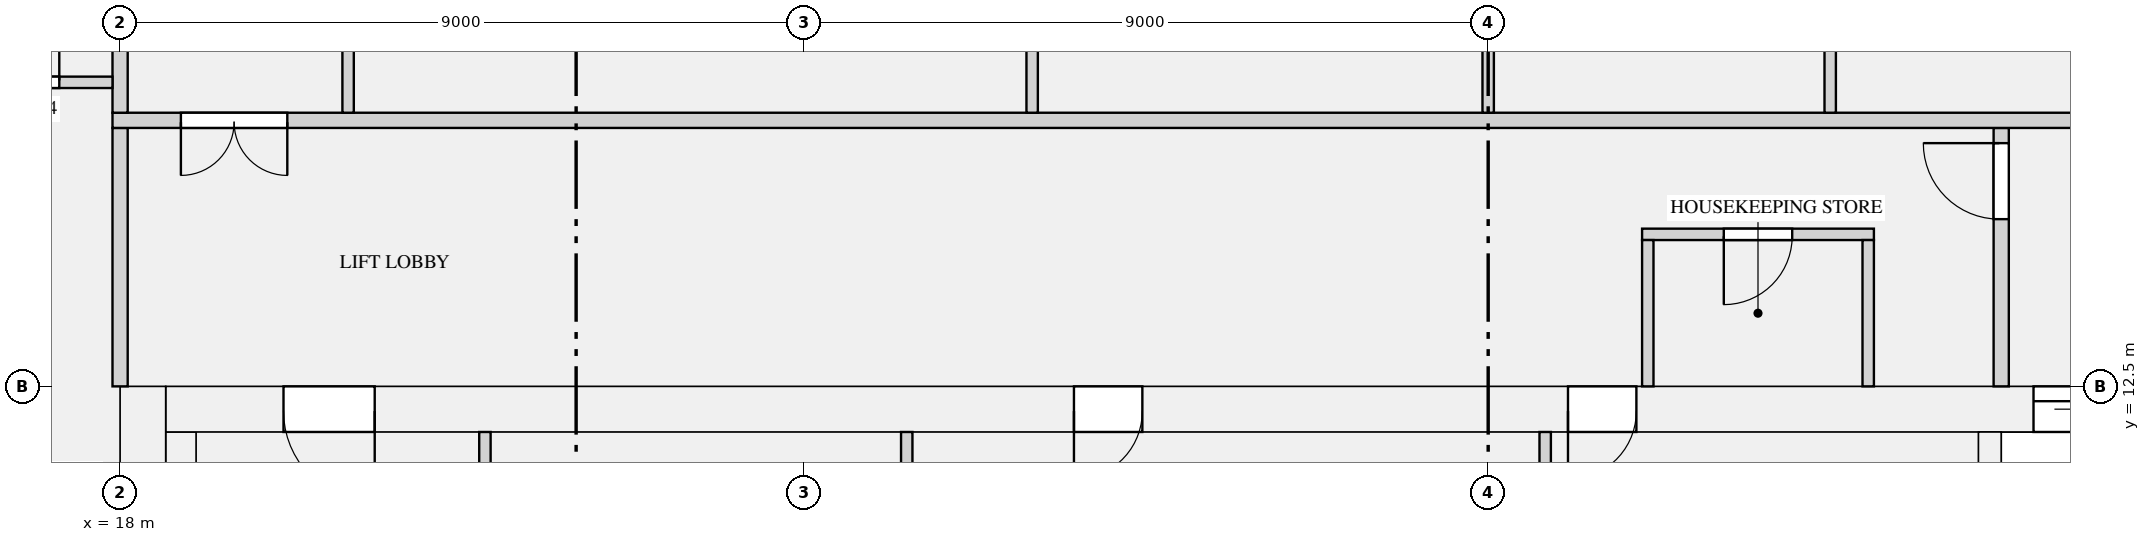
"""IFC4 building model, lengths in metres.
Left out: names, types, materials, properties, quantities, classifications, styles, units other than length and angle.
Written with IfcOpenShell. Run it as: python <this file> out.ifc"""

import sys

from ifc_helpers import new_model, si_unit, direction, frame, frame_2d, origin, place, context, subcontext, project, spatial, rectangle, extrude, element, fill, save


model = new_model("IFC4")
c1 = context("Model", 3, precision=1e-05, world=origin(), true_north=direction((0.0, 1.0)))
c2 = subcontext(c1, "Body", "Model", "MODEL_VIEW")
j1 = project(units=[si_unit("LENGTHUNIT", "METRE"), si_unit("PLANEANGLEUNIT", "RADIAN")], contexts=[c1])
p1 = place(None, origin())
s1 = spatial("IfcSite", under=j1, at=p1, CompositionType="ELEMENT")
p2 = place(p1, origin())
s2 = spatial("IfcBuilding", under=s1, at=p2, CompositionType="ELEMENT")
p3 = place(p2, frame((0.0, 0.0, 223.2)))
s3 = spatial("IfcBuildingStorey", under=s2, at=p3, CompositionType="ELEMENT", Elevation=223.2)
p4 = place(p3, frame((18.3, 0.0, 0.0), z_axis=(0.0, 0.0, 1.0), x_axis=(0.0, 1.0, 0.0)))
e1 = element("IfcWall", 1, at=p4, inside=s3, PredefinedType="SHEAR", context=c2, shape_type="SweptSolid", body=[
    extrude(rectangle(XDim=12.5, YDim=0.6, at=frame_2d((6.25, 0.0))), origin(), (0.0, 0.0, 1.0), 3.15),
])
p5 = place(p3, frame((18.6, 12.2, 0.0), z_axis=(0.0, 0.0, 1.0), x_axis=(1.0, 0.0, 0.0)))
e2 = element("IfcWall", 2, at=p5, inside=s3, PredefinedType="SHEAR", context=c2, shape_type="SweptSolid", body=[
    extrude(rectangle(XDim=34.8, YDim=0.6, at=frame_2d((17.4, 0.0))), origin(), (0.0, 0.0, 1.0), 3.15),
])
p6 = place(p5, frame((24.575, 0.0, 0.0)))
e3 = element("IfcOpeningElement", 3, at=p6, cuts=e2, PredefinedType="OPENING", context=c2, shape_type="SweptSolid", body=[
    extrude(rectangle(XDim=1.1, YDim=2.1, at=frame_2d((0.55, 1.05))), frame((0.0, 0.31, 0.0), z_axis=(0.0, -1.0, 0.0), x_axis=(1.0, 0.0, 0.0)), (0.0, 0.0, 1.0), 0.62),
])
p7 = place(p5, frame((26.825, 0.0, 0.0)))
e4 = element("IfcOpeningElement", 4, at=p7, cuts=e2, PredefinedType="OPENING", context=c2, shape_type="SweptSolid", body=[
    extrude(rectangle(XDim=1.1, YDim=2.1, at=frame_2d((0.55, 1.05))), frame((0.0, 0.31, 0.0), z_axis=(0.0, -1.0, 0.0), x_axis=(1.0, 0.0, 0.0)), (0.0, 0.0, 1.0), 0.62),
])
p8 = place(p5, frame((29.075, 0.0, 0.0)))
e5 = element("IfcOpeningElement", 5, at=p8, cuts=e2, PredefinedType="OPENING", context=c2, shape_type="SweptSolid", body=[
    extrude(rectangle(XDim=1.1, YDim=2.1, at=frame_2d((0.55, 1.05))), frame((0.0, 0.31, 0.0), z_axis=(0.0, -1.0, 0.0), x_axis=(1.0, 0.0, 0.0)), (0.0, 0.0, 1.0), 0.62),
])
p9 = place(p5, frame((11.95, 0.0, 0.0)))
e6 = element("IfcOpeningElement", 6, at=p9, cuts=e2, PredefinedType="OPENING", context=c2, shape_type="SweptSolid", body=[
    extrude(rectangle(XDim=0.9, YDim=2.1, at=frame_2d((0.45, 1.05))), frame((0.0, 0.31, 0.0), z_axis=(0.0, -1.0, 0.0), x_axis=(1.0, 0.0, 0.0)), (0.0, 0.0, 1.0), 0.62),
])
p10 = place(p5, frame((18.45, 0.0, 0.0)))
e7 = element("IfcOpeningElement", 7, at=p10, cuts=e2, PredefinedType="OPENING", context=c2, shape_type="SweptSolid", body=[
    extrude(rectangle(XDim=0.9, YDim=2.1, at=frame_2d((0.45, 1.05))), frame((0.0, 0.31, 0.0), z_axis=(0.0, -1.0, 0.0), x_axis=(1.0, 0.0, 0.0)), (0.0, 0.0, 1.0), 0.62),
])
p11 = place(p5, frame((1.55, 0.0, 0.0)))
e8 = element("IfcOpeningElement", 8, at=p11, cuts=e2, PredefinedType="OPENING", context=c2, shape_type="SweptSolid", body=[
    extrude(rectangle(XDim=1.2, YDim=2.1, at=frame_2d((0.6, 1.05))), frame((0.0, 0.31, 0.0), z_axis=(0.0, -1.0, 0.0), x_axis=(1.0, 0.0, 0.0)), (0.0, 0.0, 1.0), 0.62),
])
p12 = place(p5, frame((32.05, 0.0, 0.0)))
e9 = element("IfcOpeningElement", 9, at=p12, cuts=e2, PredefinedType="OPENING", context=c2, shape_type="SweptSolid", body=[
    extrude(rectangle(XDim=1.2, YDim=2.1, at=frame_2d((0.6, 1.05))), frame((0.0, 0.31, 0.0), z_axis=(0.0, -1.0, 0.0), x_axis=(1.0, 0.0, 0.0)), (0.0, 0.0, 1.0), 0.62),
])
p13 = place(p3, frame((18.8, 1.0, 0.0), z_axis=(0.0, 0.0, 1.0), x_axis=(0.0, 1.0, 0.0)))
e10 = element("IfcWall", 10, at=p13, inside=s3, PredefinedType="SHEAR", context=c2, shape_type="SweptSolid", body=[
    extrude(rectangle(XDim=10.9, YDim=0.4, at=frame_2d((5.45, 0.0))), origin(), (0.0, 0.0, 1.0), 3.15),
])
p14 = place(p3, frame((42.6, 8.25, 0.0), z_axis=(0.0, 0.0, 1.0), x_axis=(0.0, 1.0, 0.0)))
e11 = element("IfcWall", 11, at=p14, inside=s3, PredefinedType="SHEAR", context=c2, shape_type="SweptSolid", body=[
    extrude(rectangle(XDim=3.65, YDim=0.3, at=frame_2d((1.825, 0.0))), origin(), (0.0, 0.0, 1.0), 3.15),
])
p15 = place(p3, frame((38.025, 14.5, 0.0), z_axis=(0.0, 0.0, 1.0), x_axis=(1.0, 0.0, 0.0)))
e12 = element("IfcWall", 12, at=p15, inside=s3, PredefinedType="PARTITIONING", context=c2, shape_type="SweptSolid", body=[
    extrude(rectangle(XDim=3.05, YDim=0.15, at=frame_2d((1.525, 0.0))), origin(), (0.0, 0.0, 1.0), 2.83),
])
p16 = place(p15, frame((1.075, 0.0, 0.0)))
e13 = element("IfcOpeningElement", 13, at=p16, cuts=e12, PredefinedType="OPENING", context=c2, shape_type="SweptSolid", body=[
    extrude(rectangle(XDim=0.9, YDim=2.1, at=frame_2d((0.45, 1.05))), frame((0.0, 0.085, 0.0), z_axis=(0.0, -1.0, 0.0), x_axis=(1.0, 0.0, 0.0)), (0.0, 0.0, 1.0), 0.17),
])
p17 = place(p3, frame((22.8, 6.725, 0.0), z_axis=(0.0, 0.0, 1.0), x_axis=(0.0, 1.0, 0.0)))
e14 = element("IfcWall", 14, at=p17, inside=s3, PredefinedType="PARTITIONING", context=c2, shape_type="SweptSolid", body=[
    extrude(rectangle(XDim=5.175, YDim=0.15, at=frame_2d((2.587, 0.0))), origin(), (0.0, 0.0, 1.0), 2.83),
])
for number, where, z_axis, x_axis in (
    (15, (28.35, 9.265, 0.0), (0.0, 0.0, 1.0), (0.0, 1.0, 0.0)),
    (16, (36.75, 9.265, 0.0), (0.0, 0.0, 1.0), (0.0, 1.0, 0.0)),
):
    element("IfcWall", number, at=place(p3, frame(where, z_axis=z_axis, x_axis=x_axis)), inside=s3, PredefinedType="PARTITIONING", context=c2, shape_type="SweptSolid", body=[
        extrude(rectangle(XDim=2.635, YDim=0.15, at=frame_2d((1.317, 0.0))), origin(), (0.0, 0.0, 1.0), 2.83),
    ])
p18 = place(p3, frame((18.0, 12.5, 0.0), z_axis=(0.0, 0.0, 1.0), x_axis=(0.0, 1.0, 0.0)))
e17 = element("IfcWall", 17, at=p18, inside=s3, PredefinedType="PARTITIONING", context=c2, shape_type="SweptSolid", body=[
    extrude(rectangle(XDim=3.4, YDim=0.2, at=frame_2d((1.7, 0.0))), origin(), (0.0, 0.0, 1.0), 2.83),
])
for number, where, z_axis, x_axis in (
    (18, (38.1, 12.5, 0.0), (0.0, 0.0, 1.0), (0.0, 1.0, 0.0)),
    (19, (41.0, 12.5, 0.0), (0.0, 0.0, 1.0), (0.0, 1.0, 0.0)),
):
    element("IfcWall", number, at=place(p3, frame(where, z_axis=z_axis, x_axis=x_axis)), inside=s3, PredefinedType="PARTITIONING", context=c2, shape_type="SweptSolid", body=[
        extrude(rectangle(XDim=1.925, YDim=0.15, at=frame_2d((0.962, 0.0))), origin(), (0.0, 0.0, 1.0), 2.83),
    ])
p19 = place(p3, frame((42.75, 12.5, 0.0), z_axis=(0.0, 0.0, 1.0), x_axis=(0.0, 1.0, 0.0)))
e20 = element("IfcWall", 20, at=p19, inside=s3, PredefinedType="PARTITIONING", context=c2, shape_type="SweptSolid", body=[
    extrude(rectangle(XDim=3.4, YDim=0.2, at=frame_2d((1.7, 0.0))), origin(), (0.0, 0.0, 1.0), 2.83),
])
p20 = place(p19, frame((2.2, 0.0, 0.0)))
e21 = element("IfcOpeningElement", 21, at=p20, cuts=e20, PredefinedType="OPENING", context=c2, shape_type="SweptSolid", body=[
    extrude(rectangle(XDim=1.0, YDim=2.1, at=frame_2d((0.5, 1.05))), frame((0.0, 0.11, 0.0), z_axis=(0.0, -1.0, 0.0), x_axis=(1.0, 0.0, 0.0)), (0.0, 0.0, 1.0), 0.22),
])
p21 = place(p3, frame((12.15, 16.5, 0.0), z_axis=(0.0, 0.0, 1.0), x_axis=(1.0, 0.0, 0.0)))
e22 = element("IfcWall", 22, at=p21, inside=s3, PredefinedType="PARTITIONING", context=c2, shape_type="SweptSolid", body=[
    extrude(rectangle(XDim=5.75, YDim=0.15, at=frame_2d((2.875, 0.0))), origin(), (0.0, 0.0, 1.0), 2.83),
])
p22 = place(p21, frame((4.15, 0.0, 0.0)))
e23 = element("IfcOpeningElement", 23, at=p22, cuts=e22, PredefinedType="OPENING", context=c2, shape_type="SweptSolid", body=[
    extrude(rectangle(XDim=0.9, YDim=2.1, at=frame_2d((0.45, 1.05))), frame((0.0, 0.085, 0.0), z_axis=(0.0, -1.0, 0.0), x_axis=(1.0, 0.0, 0.0)), (0.0, 0.0, 1.0), 0.17),
])
p23 = place(p3, frame((17.9, 16.0, 0.0), z_axis=(0.0, 0.0, 1.0), x_axis=(1.0, 0.0, 0.0)))
e24 = element("IfcWall", 24, at=p23, inside=s3, PredefinedType="PARTITIONING", context=c2, shape_type="SweptSolid", body=[
    extrude(rectangle(XDim=36.2, YDim=0.2, at=frame_2d((18.1, 0.0))), origin(), (0.0, 0.0, 1.0), 2.83),
])
p24 = place(p23, frame((0.9, 0.0, 0.0)))
e25 = element("IfcOpeningElement", 25, at=p24, cuts=e24, PredefinedType="OPENING", context=c2, shape_type="SweptSolid", body=[
    extrude(rectangle(XDim=1.4, YDim=2.1, at=frame_2d((0.7, 1.05))), frame((0.0, 0.11, 0.0), z_axis=(0.0, -1.0, 0.0), x_axis=(1.0, 0.0, 0.0)), (0.0, 0.0, 1.0), 0.22),
])
p25 = place(p23, frame((33.9, 0.0, 0.0)))
e26 = element("IfcOpeningElement", 26, at=p25, cuts=e24, PredefinedType="OPENING", context=c2, shape_type="SweptSolid", body=[
    extrude(rectangle(XDim=1.4, YDim=2.1, at=frame_2d((0.7, 1.05))), frame((0.0, 0.11, 0.0), z_axis=(0.0, -1.0, 0.0), x_axis=(1.0, 0.0, 0.0)), (0.0, 0.0, 1.0), 0.22),
])
p26 = place(p3, frame((18.0, 16.1, 0.0), z_axis=(0.0, 0.0, 1.0), x_axis=(0.0, 1.0, 0.0)))
e27 = element("IfcWall", 27, at=p26, inside=s3, PredefinedType="PARTITIONING", context=c2, shape_type="SweptSolid", body=[
    extrude(rectangle(XDim=7.8, YDim=0.2, at=frame_2d((3.9, 0.0))), origin(), (0.0, 0.0, 1.0), 2.83),
])
p27 = place(p26, frame((1.85, 0.0, 0.0)))
e28 = element("IfcOpeningElement", 28, at=p27, cuts=e27, PredefinedType="OPENING", context=c2, shape_type="SweptSolid", body=[
    extrude(rectangle(XDim=1.1, YDim=2.1, at=frame_2d((0.55, 1.05))), frame((0.0, 0.11, 0.0), z_axis=(0.0, -1.0, 0.0), x_axis=(1.0, 0.0, 0.0)), (0.0, 0.0, 1.0), 0.22),
])
for number, where, z_axis, x_axis in (
    (29, (21.0, 16.1, 0.0), (0.0, 0.0, 1.0), (0.0, 1.0, 0.0)),
    (30, (30.0, 16.1, 0.0), (0.0, 0.0, 1.0), (0.0, 1.0, 0.0)),
    (31, (36.0, 16.1, 0.0), (0.0, 0.0, 1.0), (0.0, 1.0, 0.0)),
    (32, (40.5, 16.1, 0.0), (0.0, 0.0, 1.0), (0.0, 1.0, 0.0)),
):
    element("IfcWall", number, at=place(p3, frame(where, z_axis=z_axis, x_axis=x_axis)), inside=s3, PredefinedType="PARTITIONING", context=c2, shape_type="SweptSolid", body=[
        extrude(rectangle(XDim=4.825, YDim=0.15, at=frame_2d((2.413, 0.0))), origin(), (0.0, 0.0, 1.0), 2.83),
    ])
p28 = place(p6, origin())
e33 = element("IfcDoor", 33, at=p28, inside=s3, OperationType="DOUBLE_DOOR_SLIDING", PredefinedType="DOOR", context=c2, shape_type="SweptSolid", body=[
    extrude(rectangle(XDim=1.1, YDim=2.1, at=frame_2d((0.55, 1.05))), frame((0.0, 0.025, 0.0), z_axis=(0.0, -1.0, 0.0), x_axis=(1.0, 0.0, 0.0)), (0.0, 0.0, 1.0), 0.05),
])
fill(e3, e33)
p29 = place(p16, frame((0.9, 0.0, 0.0), z_axis=(0.0, 0.0, 1.0), x_axis=(-1.0, 0.0, 0.0)))
e34 = element("IfcDoor", 34, at=p29, inside=s3, OperationType="SINGLE_SWING_RIGHT", PredefinedType="DOOR", context=c2, shape_type="SweptSolid", body=[
    extrude(rectangle(XDim=0.9, YDim=2.1, at=frame_2d((0.45, 1.05))), frame((0.0, 0.025, 0.0), z_axis=(0.0, -1.0, 0.0), x_axis=(1.0, 0.0, 0.0)), (0.0, 0.0, 1.0), 0.05),
])
fill(e13, e34)
p30 = place(p9, frame((0.9, 0.0, 0.0), z_axis=(0.0, 0.0, 1.0), x_axis=(-1.0, 0.0, 0.0)))
e35 = element("IfcDoor", 35, at=p30, inside=s3, OperationType="SINGLE_SWING_RIGHT", PredefinedType="DOOR", context=c2, shape_type="SweptSolid", body=[
    extrude(rectangle(XDim=0.9, YDim=2.1, at=frame_2d((0.45, 1.05))), frame((0.0, 0.025, 0.0), z_axis=(0.0, -1.0, 0.0), x_axis=(1.0, 0.0, 0.0)), (0.0, 0.0, 1.0), 0.05),
])
fill(e6, e35)
p31 = place(p10, frame((0.9, 0.0, 0.0), z_axis=(0.0, 0.0, 1.0), x_axis=(-1.0, 0.0, 0.0)))
e36 = element("IfcDoor", 36, at=p31, inside=s3, OperationType="SINGLE_SWING_RIGHT", PredefinedType="DOOR", context=c2, shape_type="SweptSolid", body=[
    extrude(rectangle(XDim=0.9, YDim=2.1, at=frame_2d((0.45, 1.05))), frame((0.0, 0.025, 0.0), z_axis=(0.0, -1.0, 0.0), x_axis=(1.0, 0.0, 0.0)), (0.0, 0.0, 1.0), 0.05),
])
fill(e7, e36)
p32 = place(p11, frame((1.2, 0.0, 0.0), z_axis=(0.0, 0.0, 1.0), x_axis=(-1.0, 0.0, 0.0)))
e37 = element("IfcDoor", 37, at=p32, inside=s3, OperationType="SINGLE_SWING_LEFT", PredefinedType="DOOR", context=c2, shape_type="SweptSolid", body=[
    extrude(rectangle(XDim=1.2, YDim=2.1, at=frame_2d((0.6, 1.05))), frame((0.0, 0.025, 0.0), z_axis=(0.0, -1.0, 0.0), x_axis=(1.0, 0.0, 0.0)), (0.0, 0.0, 1.0), 0.05),
])
fill(e8, e37)
p33 = place(p20, origin())
e38 = element("IfcDoor", 38, at=p33, inside=s3, OperationType="SINGLE_SWING_RIGHT", PredefinedType="DOOR", context=c2, shape_type="SweptSolid", body=[
    extrude(rectangle(XDim=1.0, YDim=2.1, at=frame_2d((0.5, 1.05))), frame((0.0, 0.025, 0.0), z_axis=(0.0, -1.0, 0.0), x_axis=(1.0, 0.0, 0.0)), (0.0, 0.0, 1.0), 0.05),
])
fill(e21, e38)
p34 = place(p24, frame((1.4, 0.0, 0.0), z_axis=(0.0, 0.0, 1.0), x_axis=(-1.0, 0.0, 0.0)))
e39 = element("IfcDoor", 39, at=p34, inside=s3, OperationType="DOUBLE_DOOR_SINGLE_SWING", PredefinedType="DOOR", context=c2, shape_type="SweptSolid", body=[
    extrude(rectangle(XDim=1.4, YDim=2.1, at=frame_2d((0.7, 1.05))), frame((0.0, 0.025, 0.0), z_axis=(0.0, -1.0, 0.0), x_axis=(1.0, 0.0, 0.0)), (0.0, 0.0, 1.0), 0.05),
])
fill(e25, e39)
p35 = place(p22, origin())
e40 = element("IfcDoor", 40, at=p35, inside=s3, OperationType="SINGLE_SWING_RIGHT", PredefinedType="DOOR", context=c2, shape_type="SweptSolid", body=[
    extrude(rectangle(XDim=0.9, YDim=2.1, at=frame_2d((0.45, 1.05))), frame((0.0, 0.025, 0.0), z_axis=(0.0, -1.0, 0.0), x_axis=(1.0, 0.0, 0.0)), (0.0, 0.0, 1.0), 0.05),
])
fill(e23, e40)
save(model, sys.argv[1])
